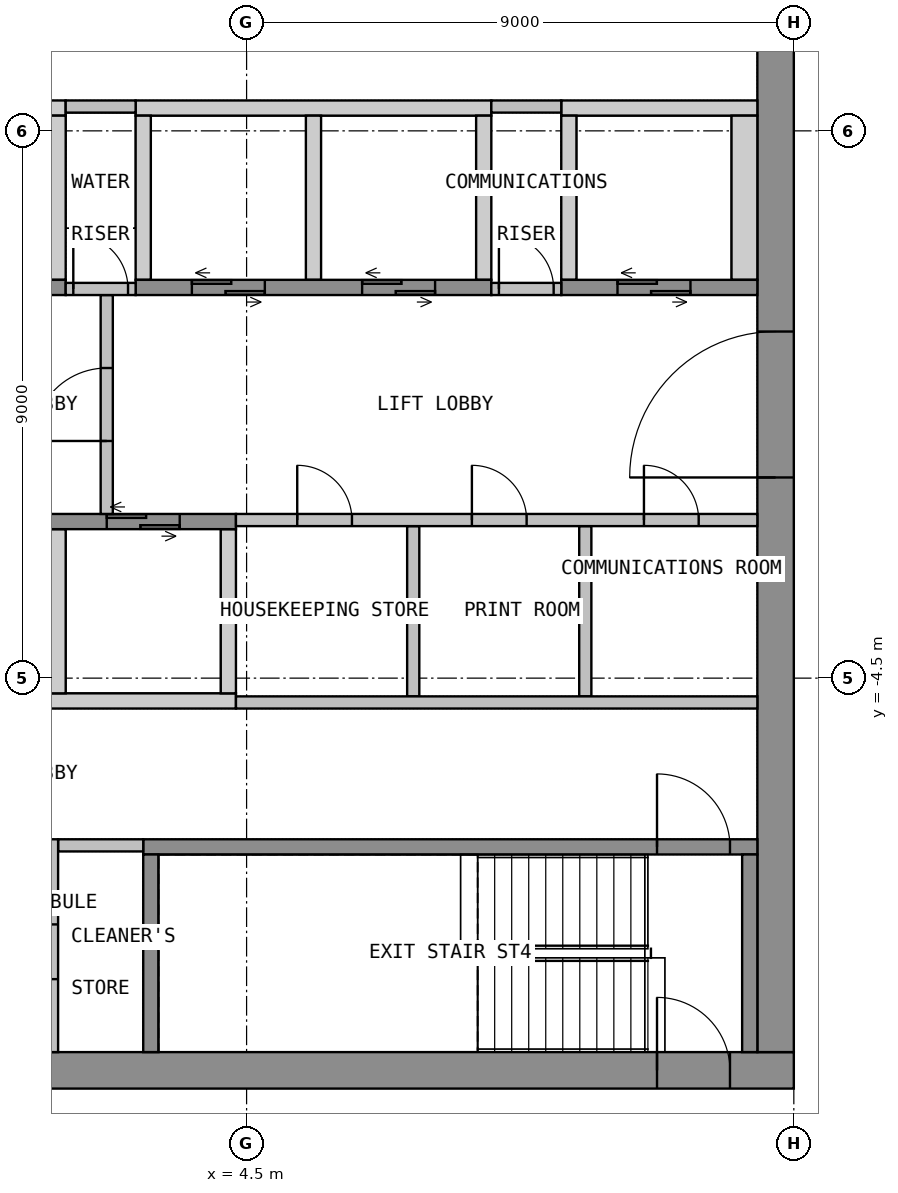
"""IFC4 building model, lengths in metres.
Left out: names, types, materials, properties, quantities, classifications, styles, units other than length and angle.
Written with IfcOpenShell. Run it as: python <this file> out.ifc"""

import sys

from ifc_helpers import new_model, si_unit, direction, frame, frame_2d, origin, place, context, subcontext, project, spatial, polyline, rectangle, outline, extrude, element, fill, save


model = new_model("IFC4")
c1 = context("Model", 3, precision=1e-05, world=origin(), true_north=direction((0.0, 1.0)))
c2 = subcontext(c1, "Body", "Model", "MODEL_VIEW")
j1 = project(units=[si_unit("LENGTHUNIT", "METRE"), si_unit("PLANEANGLEUNIT", "RADIAN")], contexts=[c1])
p1 = place(None, origin())
s1 = spatial("IfcSite", under=j1, at=p1, CompositionType="ELEMENT")
p2 = place(p1, origin())
s2 = spatial("IfcBuilding", under=s1, at=p2, CompositionType="ELEMENT")
p3 = place(p2, frame((0.0, 0.0, 286.5)))
s3 = spatial("IfcBuildingStorey", under=s2, at=p3, CompositionType="ELEMENT", Elevation=286.5)
p4 = place(p3, frame((-13.5, -10.95, 0.0), z_axis=(0.0, 0.0, 1.0), x_axis=(1.0, 0.0, 0.0)))
e1 = element("IfcWall", 1, at=p4, inside=s3, PredefinedType="SHEAR", context=c2, shape_type="SweptSolid", body=[
    extrude(rectangle(XDim=27.0, YDim=0.6, at=frame_2d((13.5, 0.0))), origin(), (0.0, 0.0, 1.0), 3.575),
])
p5 = place(p4, frame((12.3, 0.0, 0.0)))
e2 = element("IfcOpeningElement", 2, at=p5, cuts=e1, PredefinedType="OPENING", context=c2, shape_type="SweptSolid", body=[
    extrude(rectangle(XDim=2.4, YDim=2.1, at=frame_2d((1.2, 1.05))), frame((0.0, 0.31, 0.0), z_axis=(0.0, -1.0, 0.0), x_axis=(1.0, 0.0, 0.0)), (0.0, 0.0, 1.0), 0.62),
])
p6 = place(p4, frame((1.05, 0.0, 0.0)))
e3 = element("IfcOpeningElement", 3, at=p6, cuts=e1, PredefinedType="OPENING", context=c2, shape_type="SweptSolid", body=[
    extrude(rectangle(XDim=1.2, YDim=2.1, at=frame_2d((0.6, 1.05))), frame((0.0, 0.31, 0.0), z_axis=(0.0, -1.0, 0.0), x_axis=(1.0, 0.0, 0.0)), (0.0, 0.0, 1.0), 0.62),
])
p7 = place(p4, frame((24.75, 0.0, 0.0)))
e4 = element("IfcOpeningElement", 4, at=p7, cuts=e1, PredefinedType="OPENING", context=c2, shape_type="SweptSolid", body=[
    extrude(rectangle(XDim=1.2, YDim=2.1, at=frame_2d((0.6, 1.05))), frame((0.0, 0.31, 0.0), z_axis=(0.0, -1.0, 0.0), x_axis=(1.0, 0.0, 0.0)), (0.0, 0.0, 1.0), 0.62),
])
p8 = place(p3, frame((13.2, -10.65, 0.0), z_axis=(0.0, 0.0, 1.0), x_axis=(0.0, 1.0, 0.0)))
e5 = element("IfcWall", 5, at=p8, inside=s3, PredefinedType="SHEAR", context=c2, shape_type="SweptSolid", body=[
    extrude(rectangle(XDim=21.3, YDim=0.6, at=frame_2d((10.65, 0.0))), origin(), (0.0, 0.0, 1.0), 3.575),
])
p9 = place(p8, frame((9.45, 0.0, 0.0)))
e6 = element("IfcOpeningElement", 6, at=p9, cuts=e5, PredefinedType="OPENING", context=c2, shape_type="SweptSolid", body=[
    extrude(rectangle(XDim=2.4, YDim=2.1, at=frame_2d((1.2, 1.05))), frame((0.0, 0.31, 0.0), z_axis=(0.0, -1.0, 0.0), x_axis=(1.0, 0.0, 0.0)), (0.0, 0.0, 1.0), 0.62),
])
p10 = place(p3, origin())
e7 = element("IfcWall", 7, at=p10, inside=s3, PredefinedType="SHEAR", context=c2, shape_type="SweptSolid", body=[
    extrude(outline(polyline([(-1.525, 4.75), (1.525, 4.75), (1.525, 5.0), (-1.525, 5.0), (-1.525, 4.75)])), origin(), (0.0, 0.0, 1.0), 3.575),
])
p11 = place(p3, origin())
e8 = element("IfcWall", 8, at=p11, inside=s3, PredefinedType="SHEAR", context=c2, shape_type="SweptSolid", body=[
    extrude(outline(polyline([(2.675, 4.75), (8.525, 4.75), (8.525, 5.0), (2.675, 5.0), (2.675, 4.75)])), origin(), (0.0, 0.0, 1.0), 3.575),
])
p12 = place(p3, origin())
e9 = element("IfcWall", 9, at=p12, inside=s3, PredefinedType="SHEAR", context=c2, shape_type="SweptSolid", body=[
    extrude(outline(polyline([(9.675, 4.75), (12.9, 4.75), (12.9, 5.0), (9.675, 5.0), (9.675, 4.75)])), origin(), (0.0, 0.0, 1.0), 3.575),
])
p13 = place(p3, origin())
e10 = element("IfcWall", 10, at=p13, inside=s3, PredefinedType="SHEAR", context=c2, shape_type="SweptSolid", body=[
    extrude(outline(polyline([(1.275, 2.05), (1.525, 2.05), (1.525, 4.75), (1.275, 4.75), (1.275, 2.05)])), origin(), (0.0, 0.0, 1.0), 3.575),
])
p14 = place(p3, origin())
e11 = element("IfcWall", 11, at=p14, inside=s3, PredefinedType="SHEAR", context=c2, shape_type="SweptSolid", body=[
    extrude(outline(polyline([(2.675, 2.05), (2.925, 2.05), (2.925, 4.75), (2.675, 4.75), (2.675, 2.05)])), origin(), (0.0, 0.0, 1.0), 3.575),
])
p15 = place(p3, origin())
e12 = element("IfcWall", 12, at=p15, inside=s3, PredefinedType="SHEAR", context=c2, shape_type="SweptSolid", body=[
    extrude(outline(polyline([(5.475, 2.05), (5.725, 2.05), (5.725, 4.75), (5.475, 4.75), (5.475, 2.05)])), origin(), (0.0, 0.0, 1.0), 3.575),
])
p16 = place(p3, origin())
e13 = element("IfcWall", 13, at=p16, inside=s3, PredefinedType="SHEAR", context=c2, shape_type="SweptSolid", body=[
    extrude(outline(polyline([(8.275, 2.05), (8.525, 2.05), (8.525, 4.75), (8.275, 4.75), (8.275, 2.05)])), origin(), (0.0, 0.0, 1.0), 3.575),
])
p17 = place(p3, origin())
e14 = element("IfcWall", 14, at=p17, inside=s3, PredefinedType="SHEAR", context=c2, shape_type="SweptSolid", body=[
    extrude(outline(polyline([(9.675, 2.05), (9.925, 2.05), (9.925, 4.75), (9.675, 4.75), (9.675, 2.05)])), origin(), (0.0, 0.0, 1.0), 3.575),
])
p18 = place(p3, origin())
e15 = element("IfcWall", 15, at=p18, inside=s3, PredefinedType="SHEAR", context=c2, shape_type="SweptSolid", body=[
    extrude(outline(polyline([(12.475, 2.05), (12.9, 2.05), (12.9, 4.75), (12.475, 4.75), (12.475, 2.05)])), origin(), (0.0, 0.0, 1.0), 3.575),
])
p19 = place(p3, frame((-1.525, 1.925, 0.0), z_axis=(0.0, 0.0, 1.0), x_axis=(1.0, 0.0, 0.0)))
e16 = element("IfcWall", 16, at=p19, inside=s3, PredefinedType="SHEAR", context=c2, shape_type="SweptSolid", body=[
    extrude(rectangle(XDim=3.05, YDim=0.25, at=frame_2d((1.525, 0.0))), origin(), (0.0, 0.0, 1.0), 3.575),
])
p20 = place(p19, frame((0.925, 0.0, 0.0)))
e17 = element("IfcOpeningElement", 17, at=p20, cuts=e16, PredefinedType="OPENING", context=c2, shape_type="SweptSolid", body=[
    extrude(rectangle(XDim=1.2, YDim=2.1, at=frame_2d((0.6, 1.05))), frame((0.0, 0.135, 0.0), z_axis=(0.0, -1.0, 0.0), x_axis=(1.0, 0.0, 0.0)), (0.0, 0.0, 1.0), 0.27),
])
p21 = place(p3, frame((2.675, 1.925, 0.0), z_axis=(0.0, 0.0, 1.0), x_axis=(1.0, 0.0, 0.0)))
e18 = element("IfcWall", 18, at=p21, inside=s3, PredefinedType="SHEAR", context=c2, shape_type="SweptSolid", body=[
    extrude(rectangle(XDim=5.85, YDim=0.25, at=frame_2d((2.925, 0.0))), origin(), (0.0, 0.0, 1.0), 3.575),
])
p22 = place(p21, frame((0.925, 0.0, 0.0)))
e19 = element("IfcOpeningElement", 19, at=p22, cuts=e18, PredefinedType="OPENING", context=c2, shape_type="SweptSolid", body=[
    extrude(rectangle(XDim=1.2, YDim=2.1, at=frame_2d((0.6, 1.05))), frame((0.0, 0.135, 0.0), z_axis=(0.0, -1.0, 0.0), x_axis=(1.0, 0.0, 0.0)), (0.0, 0.0, 1.0), 0.27),
])
p23 = place(p21, frame((3.725, 0.0, 0.0)))
e20 = element("IfcOpeningElement", 20, at=p23, cuts=e18, PredefinedType="OPENING", context=c2, shape_type="SweptSolid", body=[
    extrude(rectangle(XDim=1.2, YDim=2.1, at=frame_2d((0.6, 1.05))), frame((0.0, 0.135, 0.0), z_axis=(0.0, -1.0, 0.0), x_axis=(1.0, 0.0, 0.0)), (0.0, 0.0, 1.0), 0.27),
])
p24 = place(p3, frame((9.675, 1.925, 0.0), z_axis=(0.0, 0.0, 1.0), x_axis=(1.0, 0.0, 0.0)))
e21 = element("IfcWall", 21, at=p24, inside=s3, PredefinedType="SHEAR", context=c2, shape_type="SweptSolid", body=[
    extrude(rectangle(XDim=3.225, YDim=0.25, at=frame_2d((1.612, 0.0))), origin(), (0.0, 0.0, 1.0), 3.575),
])
p25 = place(p24, frame((0.925, 0.0, 0.0)))
e22 = element("IfcOpeningElement", 22, at=p25, cuts=e21, PredefinedType="OPENING", context=c2, shape_type="SweptSolid", body=[
    extrude(rectangle(XDim=1.2, YDim=2.1, at=frame_2d((0.6, 1.05))), frame((0.0, 0.135, 0.0), z_axis=(0.0, -1.0, 0.0), x_axis=(1.0, 0.0, 0.0)), (0.0, 0.0, 1.0), 0.27),
])
p26 = place(p3, origin())
e23 = element("IfcWall", 23, at=p26, inside=s3, PredefinedType="SHEAR", context=c2, shape_type="SweptSolid", body=[
    extrude(outline(polyline([(-1.525, -5.0), (4.325, -5.0), (4.325, -4.75), (-1.525, -4.75), (-1.525, -5.0)])), origin(), (0.0, 0.0, 1.0), 3.575),
])
p27 = place(p3, origin())
e24 = element("IfcWall", 24, at=p27, inside=s3, PredefinedType="SHEAR", context=c2, shape_type="SweptSolid", body=[
    extrude(outline(polyline([(1.275, -4.75), (1.525, -4.75), (1.525, -2.05), (1.275, -2.05), (1.275, -4.75)])), origin(), (0.0, 0.0, 1.0), 3.575),
])
p28 = place(p3, origin())
e25 = element("IfcWall", 25, at=p28, inside=s3, PredefinedType="SHEAR", context=c2, shape_type="SweptSolid", body=[
    extrude(outline(polyline([(4.075, -4.75), (4.325, -4.75), (4.325, -2.05), (4.075, -2.05), (4.075, -4.75)])), origin(), (0.0, 0.0, 1.0), 3.575),
])
p29 = place(p3, frame((-1.525, -1.925, 0.0), z_axis=(0.0, 0.0, 1.0), x_axis=(1.0, 0.0, 0.0)))
e26 = element("IfcWall", 26, at=p29, inside=s3, PredefinedType="SHEAR", context=c2, shape_type="SweptSolid", body=[
    extrude(rectangle(XDim=5.85, YDim=0.25, at=frame_2d((2.925, 0.0))), origin(), (0.0, 0.0, 1.0), 3.575),
])
p30 = place(p29, frame((0.925, 0.0, 0.0)))
e27 = element("IfcOpeningElement", 27, at=p30, cuts=e26, PredefinedType="OPENING", context=c2, shape_type="SweptSolid", body=[
    extrude(rectangle(XDim=1.2, YDim=2.1, at=frame_2d((0.6, 1.05))), frame((0.0, 0.135, 0.0), z_axis=(0.0, -1.0, 0.0), x_axis=(1.0, 0.0, 0.0)), (0.0, 0.0, 1.0), 0.27),
])
p31 = place(p29, frame((3.725, 0.0, 0.0)))
e28 = element("IfcOpeningElement", 28, at=p31, cuts=e26, PredefinedType="OPENING", context=c2, shape_type="SweptSolid", body=[
    extrude(rectangle(XDim=1.2, YDim=2.1, at=frame_2d((0.6, 1.05))), frame((0.0, 0.135, 0.0), z_axis=(0.0, -1.0, 0.0), x_axis=(1.0, 0.0, 0.0)), (0.0, 0.0, 1.0), 0.27),
])
p32 = place(p3, frame((2.2, -1.8, 0.0), z_axis=(0.0, 0.0, 1.0), x_axis=(0.0, 1.0, 0.0)))
e29 = element("IfcWall", 29, at=p32, inside=s3, PredefinedType="PARTITIONING", context=c2, shape_type="SweptSolid", body=[
    extrude(rectangle(XDim=3.6, YDim=0.2, at=frame_2d((1.8, 0.0))), origin(), (0.0, 0.0, 1.0), 3.575),
])
p33 = place(p32, frame((1.2, 0.0, 0.0)))
e30 = element("IfcOpeningElement", 30, at=p33, cuts=e29, PredefinedType="OPENING", context=c2, shape_type="SweptSolid", body=[
    extrude(rectangle(XDim=1.2, YDim=2.1, at=frame_2d((0.6, 1.05))), frame((0.0, 0.11, 0.0), z_axis=(0.0, -1.0, 0.0), x_axis=(1.0, 0.0, 0.0)), (0.0, 0.0, 1.0), 0.22),
])
p34 = place(p3, frame((2.8, -7.275, 0.0), z_axis=(0.0, 0.0, 1.0), x_axis=(1.0, 0.0, 0.0)))
e31 = element("IfcWall", 31, at=p34, inside=s3, PredefinedType="SHEAR", context=c2, shape_type="SweptSolid", body=[
    extrude(rectangle(XDim=10.1, YDim=0.25, at=frame_2d((5.05, 0.0))), origin(), (0.0, 0.0, 1.0), 3.575),
])
p35 = place(p34, frame((8.45, 0.0, 0.0)))
e32 = element("IfcOpeningElement", 32, at=p35, cuts=e31, PredefinedType="OPENING", context=c2, shape_type="SweptSolid", body=[
    extrude(rectangle(XDim=1.2, YDim=2.1, at=frame_2d((0.6, 1.05))), frame((0.0, 0.135, 0.0), z_axis=(0.0, -1.0, 0.0), x_axis=(1.0, 0.0, 0.0)), (0.0, 0.0, 1.0), 0.27),
])
for number, where, z_axis, x_axis in (
    (33, (2.925, -10.65, 0.0), (0.0, 0.0, 1.0), (0.0, 1.0, 0.0)),
    (34, (12.775, -10.65, 0.0), (0.0, 0.0, 1.0), (0.0, 1.0, 0.0)),
):
    element("IfcWall", number, at=place(p3, frame(where, z_axis=z_axis, x_axis=x_axis)), inside=s3, PredefinedType="SHEAR", context=c2, shape_type="SweptSolid", body=[
        extrude(rectangle(XDim=3.25, YDim=0.25, at=frame_2d((1.625, 0.0))), origin(), (0.0, 0.0, 1.0), 3.575),
    ])
p36 = place(p3, frame((1.4, -7.25, 0.0), z_axis=(0.0, 0.0, 1.0), x_axis=(1.0, 0.0, 0.0)))
e35 = element("IfcWall", 35, at=p36, inside=s3, PredefinedType="PARTITIONING", context=c2, shape_type="SweptSolid", body=[
    extrude(rectangle(XDim=1.4, YDim=0.2, at=frame_2d((0.7, 0.0))), origin(), (0.0, 0.0, 1.0), 3.575),
])
p37 = place(p3, frame((1.3, -10.65, 0.0), z_axis=(0.0, 0.0, 1.0), x_axis=(0.0, 1.0, 0.0)))
e36 = element("IfcWall", 36, at=p37, inside=s3, PredefinedType="PARTITIONING", context=c2, shape_type="SweptSolid", body=[
    extrude(rectangle(XDim=3.5, YDim=0.2, at=frame_2d((1.75, 0.0))), origin(), (0.0, 0.0, 1.0), 3.575),
])
p38 = place(p37, frame((1.2, 0.0, 0.0)))
e37 = element("IfcOpeningElement", 37, at=p38, cuts=e36, PredefinedType="OPENING", context=c2, shape_type="SweptSolid", body=[
    extrude(rectangle(XDim=0.9, YDim=2.1, at=frame_2d((0.45, 1.05))), frame((0.0, 0.11, 0.0), z_axis=(0.0, -1.0, 0.0), x_axis=(1.0, 0.0, 0.0)), (0.0, 0.0, 1.0), 0.22),
])
p39 = place(p3, frame((1.525, 1.9, 0.0), z_axis=(0.0, 0.0, 1.0), x_axis=(1.0, 0.0, 0.0)))
e38 = element("IfcWall", 38, at=p39, inside=s3, PredefinedType="PARTITIONING", context=c2, shape_type="SweptSolid", body=[
    extrude(rectangle(XDim=1.15, YDim=0.2, at=frame_2d((0.575, 0.0))), origin(), (0.0, 0.0, 1.0), 3.575),
])
p40 = place(p39, frame((0.125, 0.0, 0.0)))
e39 = element("IfcOpeningElement", 39, at=p40, cuts=e38, PredefinedType="OPENING", context=c2, shape_type="SweptSolid", body=[
    extrude(rectangle(XDim=0.9, YDim=2.1, at=frame_2d((0.45, 1.05))), frame((0.0, 0.11, 0.0), z_axis=(0.0, -1.0, 0.0), x_axis=(1.0, 0.0, 0.0)), (0.0, 0.0, 1.0), 0.22),
])
p41 = place(p3, frame((1.525, 4.9, 0.0), z_axis=(0.0, 0.0, 1.0), x_axis=(1.0, 0.0, 0.0)))
e40 = element("IfcWall", 40, at=p41, inside=s3, PredefinedType="PARTITIONING", context=c2, shape_type="SweptSolid", body=[
    extrude(rectangle(XDim=1.15, YDim=0.2, at=frame_2d((0.575, 0.0))), origin(), (0.0, 0.0, 1.0), 3.575),
])
p42 = place(p3, frame((8.525, 1.9, 0.0), z_axis=(0.0, 0.0, 1.0), x_axis=(1.0, 0.0, 0.0)))
e41 = element("IfcWall", 41, at=p42, inside=s3, PredefinedType="PARTITIONING", context=c2, shape_type="SweptSolid", body=[
    extrude(rectangle(XDim=1.15, YDim=0.2, at=frame_2d((0.575, 0.0))), origin(), (0.0, 0.0, 1.0), 3.575),
])
p43 = place(p42, frame((0.125, 0.0, 0.0)))
e42 = element("IfcOpeningElement", 42, at=p43, cuts=e41, PredefinedType="OPENING", context=c2, shape_type="SweptSolid", body=[
    extrude(rectangle(XDim=0.9, YDim=2.1, at=frame_2d((0.45, 1.05))), frame((0.0, 0.11, 0.0), z_axis=(0.0, -1.0, 0.0), x_axis=(1.0, 0.0, 0.0)), (0.0, 0.0, 1.0), 0.22),
])
p44 = place(p3, frame((8.525, 4.9, 0.0), z_axis=(0.0, 0.0, 1.0), x_axis=(1.0, 0.0, 0.0)))
e43 = element("IfcWall", 43, at=p44, inside=s3, PredefinedType="PARTITIONING", context=c2, shape_type="SweptSolid", body=[
    extrude(rectangle(XDim=1.15, YDim=0.2, at=frame_2d((0.575, 0.0))), origin(), (0.0, 0.0, 1.0), 3.575),
])
for number, where, z_axis, x_axis in (
    (44, (7.24, -4.8, 0.0), (0.0, 0.0, 1.0), (0.0, 1.0, 0.0)),
    (45, (10.07, -4.8, 0.0), (0.0, 0.0, 1.0), (0.0, 1.0, 0.0)),
):
    element("IfcWall", number, at=place(p3, frame(where, z_axis=z_axis, x_axis=x_axis)), inside=s3, PredefinedType="PARTITIONING", context=c2, shape_type="SweptSolid", body=[
        extrude(rectangle(XDim=2.8, YDim=0.2, at=frame_2d((1.4, 0.0))), origin(), (0.0, 0.0, 1.0), 3.575),
    ])
p45 = place(p3, frame((4.325, -1.9, 0.0), z_axis=(0.0, 0.0, 1.0), x_axis=(1.0, 0.0, 0.0)))
e46 = element("IfcWall", 46, at=p45, inside=s3, PredefinedType="PARTITIONING", context=c2, shape_type="SweptSolid", body=[
    extrude(rectangle(XDim=8.575, YDim=0.2, at=frame_2d((4.288, 0.0))), origin(), (0.0, 0.0, 1.0), 3.575),
])
p46 = place(p45, frame((1.008, 0.0, 0.0)))
e47 = element("IfcOpeningElement", 47, at=p46, cuts=e46, PredefinedType="OPENING", context=c2, shape_type="SweptSolid", body=[
    extrude(rectangle(XDim=0.9, YDim=2.1, at=frame_2d((0.45, 1.05))), frame((0.0, 0.11, 0.0), z_axis=(0.0, -1.0, 0.0), x_axis=(1.0, 0.0, 0.0)), (0.0, 0.0, 1.0), 0.22),
])
p47 = place(p45, frame((3.88, 0.0, 0.0)))
e48 = element("IfcOpeningElement", 48, at=p47, cuts=e46, PredefinedType="OPENING", context=c2, shape_type="SweptSolid", body=[
    extrude(rectangle(XDim=0.9, YDim=2.1, at=frame_2d((0.45, 1.05))), frame((0.0, 0.11, 0.0), z_axis=(0.0, -1.0, 0.0), x_axis=(1.0, 0.0, 0.0)), (0.0, 0.0, 1.0), 0.22),
])
p48 = place(p45, frame((6.71, 0.0, 0.0)))
e49 = element("IfcOpeningElement", 49, at=p48, cuts=e46, PredefinedType="OPENING", context=c2, shape_type="SweptSolid", body=[
    extrude(rectangle(XDim=0.9, YDim=2.1, at=frame_2d((0.45, 1.05))), frame((0.0, 0.11, 0.0), z_axis=(0.0, -1.0, 0.0), x_axis=(1.0, 0.0, 0.0)), (0.0, 0.0, 1.0), 0.22),
])
p49 = place(p3, frame((4.325, -4.9, 0.0), z_axis=(0.0, 0.0, 1.0), x_axis=(1.0, 0.0, 0.0)))
e50 = element("IfcWall", 50, at=p49, inside=s3, PredefinedType="PARTITIONING", context=c2, shape_type="SweptSolid", body=[
    extrude(rectangle(XDim=8.575, YDim=0.2, at=frame_2d((4.288, 0.0))), origin(), (0.0, 0.0, 1.0), 3.575),
])
p50 = place(p9, origin())
e51 = element("IfcDoor", 51, at=p50, inside=s3, OperationType="DOUBLE_DOOR_DOUBLE_SWING", PredefinedType="DOOR", context=c2, shape_type="SweptSolid", body=[
    extrude(rectangle(XDim=2.4, YDim=2.1, at=frame_2d((1.2, 1.05))), frame((0.0, 0.025, 0.0), z_axis=(0.0, -1.0, 0.0), x_axis=(1.0, 0.0, 0.0)), (0.0, 0.0, 1.0), 0.05),
])
fill(e6, e51)
p51 = place(p7, origin())
e52 = element("IfcDoor", 52, at=p51, inside=s3, OperationType="SINGLE_SWING_RIGHT", PredefinedType="DOOR", context=c2, shape_type="SweptSolid", body=[
    extrude(rectangle(XDim=1.2, YDim=2.1, at=frame_2d((0.6, 1.05))), frame((0.0, 0.025, 0.0), z_axis=(0.0, -1.0, 0.0), x_axis=(1.0, 0.0, 0.0)), (0.0, 0.0, 1.0), 0.05),
])
fill(e4, e52)
p52 = place(p22, origin())
e53 = element("IfcDoor", 53, at=p52, inside=s3, OperationType="DOUBLE_DOOR_SLIDING", PredefinedType="DOOR", context=c2, shape_type="SweptSolid", body=[
    extrude(rectangle(XDim=1.2, YDim=2.1, at=frame_2d((0.6, 1.05))), frame((0.0, 0.025, 0.0), z_axis=(0.0, -1.0, 0.0), x_axis=(1.0, 0.0, 0.0)), (0.0, 0.0, 1.0), 0.05),
])
fill(e19, e53)
p53 = place(p23, origin())
e54 = element("IfcDoor", 54, at=p53, inside=s3, OperationType="DOUBLE_DOOR_SLIDING", PredefinedType="DOOR", context=c2, shape_type="SweptSolid", body=[
    extrude(rectangle(XDim=1.2, YDim=2.1, at=frame_2d((0.6, 1.05))), frame((0.0, 0.025, 0.0), z_axis=(0.0, -1.0, 0.0), x_axis=(1.0, 0.0, 0.0)), (0.0, 0.0, 1.0), 0.05),
])
fill(e20, e54)
p54 = place(p25, origin())
e55 = element("IfcDoor", 55, at=p54, inside=s3, OperationType="DOUBLE_DOOR_SLIDING", PredefinedType="DOOR", context=c2, shape_type="SweptSolid", body=[
    extrude(rectangle(XDim=1.2, YDim=2.1, at=frame_2d((0.6, 1.05))), frame((0.0, 0.025, 0.0), z_axis=(0.0, -1.0, 0.0), x_axis=(1.0, 0.0, 0.0)), (0.0, 0.0, 1.0), 0.05),
])
fill(e22, e55)
p55 = place(p31, origin())
e56 = element("IfcDoor", 56, at=p55, inside=s3, OperationType="DOUBLE_DOOR_SLIDING", PredefinedType="DOOR", context=c2, shape_type="SweptSolid", body=[
    extrude(rectangle(XDim=1.2, YDim=2.1, at=frame_2d((0.6, 1.05))), frame((0.0, 0.025, 0.0), z_axis=(0.0, -1.0, 0.0), x_axis=(1.0, 0.0, 0.0)), (0.0, 0.0, 1.0), 0.05),
])
fill(e28, e56)
p56 = place(p33, origin())
e57 = element("IfcDoor", 57, at=p56, inside=s3, OperationType="SINGLE_SWING_LEFT", PredefinedType="DOOR", context=c2, shape_type="SweptSolid", body=[
    extrude(rectangle(XDim=1.2, YDim=2.1, at=frame_2d((0.6, 1.05))), frame((0.0, 0.025, 0.0), z_axis=(0.0, -1.0, 0.0), x_axis=(1.0, 0.0, 0.0)), (0.0, 0.0, 1.0), 0.05),
])
fill(e30, e57)
p57 = place(p35, origin())
e58 = element("IfcDoor", 58, at=p57, inside=s3, OperationType="SINGLE_SWING_LEFT", PredefinedType="DOOR", context=c2, shape_type="SweptSolid", body=[
    extrude(rectangle(XDim=1.2, YDim=2.1, at=frame_2d((0.6, 1.05))), frame((0.0, 0.025, 0.0), z_axis=(0.0, -1.0, 0.0), x_axis=(1.0, 0.0, 0.0)), (0.0, 0.0, 1.0), 0.05),
])
fill(e32, e58)
p58 = place(p38, origin())
e59 = element("IfcDoor", 59, at=p58, inside=s3, OperationType="SINGLE_SWING_LEFT", PredefinedType="DOOR", context=c2, shape_type="SweptSolid", body=[
    extrude(rectangle(XDim=0.9, YDim=2.1, at=frame_2d((0.45, 1.05))), frame((0.0, 0.025, 0.0), z_axis=(0.0, -1.0, 0.0), x_axis=(1.0, 0.0, 0.0)), (0.0, 0.0, 1.0), 0.05),
])
fill(e37, e59)
p59 = place(p40, origin())
e60 = element("IfcDoor", 60, at=p59, inside=s3, OperationType="SINGLE_SWING_LEFT", PredefinedType="DOOR", context=c2, shape_type="SweptSolid", body=[
    extrude(rectangle(XDim=0.9, YDim=2.1, at=frame_2d((0.45, 1.05))), frame((0.0, 0.025, 0.0), z_axis=(0.0, -1.0, 0.0), x_axis=(1.0, 0.0, 0.0)), (0.0, 0.0, 1.0), 0.05),
])
fill(e39, e60)
p60 = place(p43, origin())
e61 = element("IfcDoor", 61, at=p60, inside=s3, OperationType="SINGLE_SWING_LEFT", PredefinedType="DOOR", context=c2, shape_type="SweptSolid", body=[
    extrude(rectangle(XDim=0.9, YDim=2.1, at=frame_2d((0.45, 1.05))), frame((0.0, 0.025, 0.0), z_axis=(0.0, -1.0, 0.0), x_axis=(1.0, 0.0, 0.0)), (0.0, 0.0, 1.0), 0.05),
])
fill(e42, e61)
p61 = place(p46, origin())
e62 = element("IfcDoor", 62, at=p61, inside=s3, OperationType="SINGLE_SWING_LEFT", PredefinedType="DOOR", context=c2, shape_type="SweptSolid", body=[
    extrude(rectangle(XDim=0.9, YDim=2.1, at=frame_2d((0.45, 1.05))), frame((0.0, 0.025, 0.0), z_axis=(0.0, -1.0, 0.0), x_axis=(1.0, 0.0, 0.0)), (0.0, 0.0, 1.0), 0.05),
])
fill(e47, e62)
p62 = place(p47, origin())
e63 = element("IfcDoor", 63, at=p62, inside=s3, OperationType="SINGLE_SWING_LEFT", PredefinedType="DOOR", context=c2, shape_type="SweptSolid", body=[
    extrude(rectangle(XDim=0.9, YDim=2.1, at=frame_2d((0.45, 1.05))), frame((0.0, 0.025, 0.0), z_axis=(0.0, -1.0, 0.0), x_axis=(1.0, 0.0, 0.0)), (0.0, 0.0, 1.0), 0.05),
])
fill(e48, e63)
p63 = place(p48, origin())
e64 = element("IfcDoor", 64, at=p63, inside=s3, OperationType="SINGLE_SWING_LEFT", PredefinedType="DOOR", context=c2, shape_type="SweptSolid", body=[
    extrude(rectangle(XDim=0.9, YDim=2.1, at=frame_2d((0.45, 1.05))), frame((0.0, 0.025, 0.0), z_axis=(0.0, -1.0, 0.0), x_axis=(1.0, 0.0, 0.0)), (0.0, 0.0, 1.0), 0.05),
])
fill(e49, e64)
save(model, sys.argv[1])
